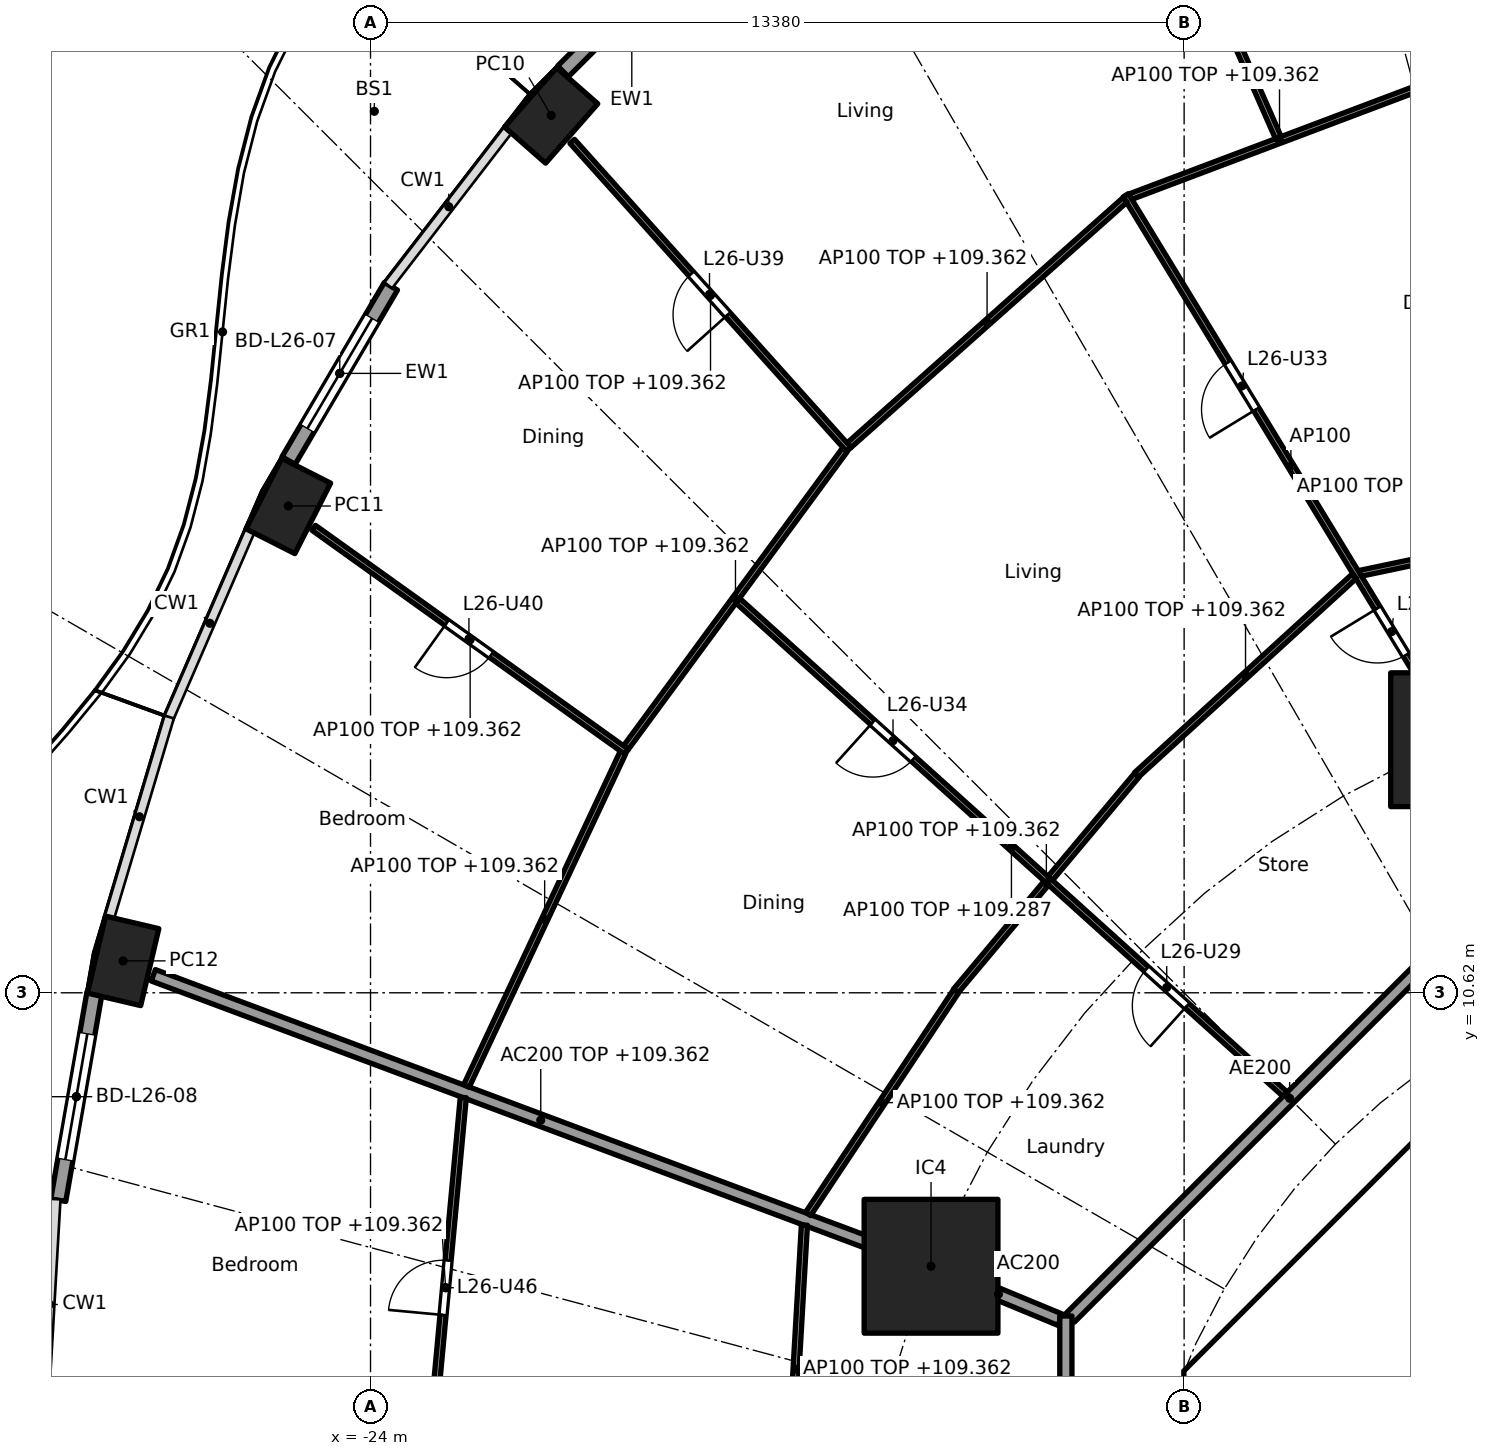
"""IFC4 building model, lengths in metres.
Left out: names, types, materials, properties, quantities, classifications, styles, units other than length and angle.
Written with IfcOpenShell. Run it as: python <this file> out.ifc"""

import sys

from ifc_helpers import new_model, si_unit, direction, frame, frame_2d, origin, origin_2d, place, context, subcontext, project, spatial, polyline, rectangle, hollow_rectangle, outline, extrude, element, fill, save


model = new_model("IFC4")
c1 = context("Model", 3, precision=1e-05, world=origin(), true_north=direction((0.0, 1.0)))
c2 = subcontext(c1, "Body", "Model", "MODEL_VIEW")
j1 = project(units=[si_unit("LENGTHUNIT", "METRE"), si_unit("PLANEANGLEUNIT", "RADIAN")], contexts=[c1])
p1 = place(None, origin())
s1 = spatial("IfcSite", under=j1, at=p1, CompositionType="ELEMENT")
p2 = place(p1, origin())
s2 = spatial("IfcBuilding", under=s1, at=p2, CompositionType="ELEMENT")
p3 = place(p2, frame((0.0, 0.0, 106.6)))
s3 = spatial("IfcBuildingStorey", under=s2, at=p3, CompositionType="ELEMENT", Elevation=106.6)
for number, where, z_axis, x_axis in (
    (1, (-21.03, 25.049, 0.0), (0.0, 0.0, 1.0), (-0.66, -0.751, 0.0)),
    (2, (-25.352, 18.625, 0.0), (0.0, 0.0, 1.0), (-0.452, -0.892, 0.0)),
    (3, (-28.068, 11.145, 0.0), (0.0, 0.0, 1.0), (-0.229, -0.973, 0.0)),
):
    element("IfcColumn", number, at=place(p3, frame(where, z_axis=z_axis, x_axis=x_axis)), inside=s3, PredefinedType="COLUMN", context=c2, shape_type="SweptSolid", body=[
        extrude(hollow_rectangle(XDim=1.3, YDim=0.9, WallThickness=0.045, at=origin_2d()), origin(), (0.0, 0.0, 1.0), 3.7),
    ])
for number, where, z_axis, x_axis in (
    (4, (-6.123, 14.782, 0.0), (0.0, 0.0, 1.0), (1.0, 0.0, 0.0)),
    (5, (-14.782, 6.123, 0.0), (0.0, 0.0, 1.0), (1.0, 0.0, 0.0)),
):
    element("IfcColumn", number, at=place(p3, frame(where, z_axis=z_axis, x_axis=x_axis)), inside=s3, PredefinedType="COLUMN", context=c2, shape_type="SweptSolid", body=[
        extrude(rectangle(XDim=2.2, YDim=2.2, at=origin_2d()), origin(), (0.0, 0.0, 1.0), 3.7),
    ])
p4 = place(p3, frame((-20.835, 25.773, 0.0), z_axis=(0.0, 0.0, 1.0), x_axis=(0.707831646613, 0.706381171927, 0.0)))
e6 = element("IfcWall", 6, at=p4, inside=s3, PredefinedType="SOLIDWALL", context=c2, shape_type="SweptSolid", body=[
    extrude(rectangle(XDim=3.198, YDim=0.25, at=frame_2d((1.599, 0.0))), origin(), (0.0, 0.0, 1.0), 3.44),
])
p5 = place(p4, frame((0.549, 0.0, 0.0)))
e7 = element("IfcOpeningElement", 7, at=p5, cuts=e6, PredefinedType="OPENING", context=c2, shape_type="SweptSolid", body=[
    extrude(rectangle(XDim=2.1, YDim=2.4, at=frame_2d((1.05, 1.2))), frame((0.0, 0.135, 0.0), z_axis=(0.0, -1.0, 0.0), x_axis=(1.0, 0.0, 0.0)), (0.0, 0.0, 1.0), 0.27),
])
p6 = place(p3, frame((-25.348, 19.372, 0.0), z_axis=(0.0, 0.0, 1.0), x_axis=(0.506352525095, 0.86232657406, 0.0)))
e8 = element("IfcWall", 8, at=p6, inside=s3, PredefinedType="SOLIDWALL", context=c2, shape_type="SweptSolid", body=[
    extrude(rectangle(XDim=3.325, YDim=0.25, at=frame_2d((1.663, 0.0))), origin(), (0.0, 0.0, 1.0), 3.44),
])
p7 = place(p6, frame((0.612, 0.0, 0.0)))
e9 = element("IfcOpeningElement", 9, at=p7, cuts=e8, PredefinedType="OPENING", context=c2, shape_type="SweptSolid", body=[
    extrude(rectangle(XDim=2.1, YDim=2.4, at=frame_2d((1.05, 1.2))), frame((0.0, 0.135, 0.0), z_axis=(0.0, -1.0, 0.0), x_axis=(1.0, 0.0, 0.0)), (0.0, 0.0, 1.0), 0.27),
])
p8 = place(p3, frame((-29.135, 7.21, 0.0), z_axis=(0.0, 0.0, 1.0), x_axis=(0.17223289558, 0.985056257114, 0.0)))
e10 = element("IfcWall", 10, at=p8, inside=s3, PredefinedType="SOLIDWALL", context=c2, shape_type="SweptSolid", body=[
    extrude(rectangle(XDim=3.454, YDim=0.25, at=frame_2d((1.727, 0.0))), origin(), (0.0, 0.0, 1.0), 3.44),
])
p9 = place(p8, frame((0.677, 0.0, 0.0)))
e11 = element("IfcOpeningElement", 11, at=p9, cuts=e10, PredefinedType="OPENING", context=c2, shape_type="SweptSolid", body=[
    extrude(rectangle(XDim=2.1, YDim=2.4, at=frame_2d((1.05, 1.2))), frame((0.0, 0.135, 0.0), z_axis=(0.0, -1.0, 0.0), x_axis=(1.0, 0.0, 0.0)), (0.0, 0.0, 1.0), 0.27),
])
p10 = place(p3, frame((-4.613, 9.988, 0.0), z_axis=(0.0, 0.0, 1.0), x_axis=(-0.707106781187, -0.707106781187, 0.0)))
e12 = element("IfcWall", 12, at=p10, inside=s3, PredefinedType="SHEAR", context=c2, shape_type="SweptSolid", body=[
    extrude(rectangle(XDim=7.602, YDim=0.6, at=frame_2d((3.801, 0.0))), origin(), (0.0, 0.0, 1.0), 3.44),
])
p11 = place(p10, frame((0.351, 0.0, 0.0)))
e13 = element("IfcOpeningElement", 13, at=p11, cuts=e12, PredefinedType="OPENING", context=c2, shape_type="SweptSolid", body=[
    extrude(rectangle(XDim=1.1, YDim=2.1, at=frame_2d((0.55, 1.05))), frame((0.0, 0.31, 0.0), z_axis=(0.0, -1.0, 0.0), x_axis=(1.0, 0.0, 0.0)), (0.0, 0.0, 1.0), 0.62),
])
p12 = place(p3, origin())
e14 = element("IfcWall", 14, at=p12, inside=s3, PredefinedType="SHEAR", context=c2, shape_type="SweptSolid", body=[
    extrude(outline(polyline([(-10.2, 4.825), (-9.776, 4.401), (-10.025, 4.152), (-10.025, 3.801), (-10.625, 3.801), (-10.625, 4.401), (-10.2, 4.825)])), origin(), (0.0, 0.0, 1.0), 3.44),
])
p13 = place(p3, frame((-8.001, 6.1, 0.0), z_axis=(0.0, 0.0, 1.0), x_axis=(1.0, 0.0, 0.0)))
e15 = element("IfcWall", 15, at=p13, inside=s3, PredefinedType="PARTITIONING", context=c2, shape_type="SweptSolid", body=[
    extrude(rectangle(XDim=2.126, YDim=0.15, at=frame_2d((1.063, 0.0))), origin(), (0.0, 0.0, 1.0), 3.44),
])
p14 = place(p3, frame((-12.657, 5.243, 0.0), z_axis=(0.0, 0.0, 1.0), x_axis=(-0.923843626288, 0.382770106157, 0.0)))
e16 = element("IfcWall", 16, at=p14, inside=s3, PredefinedType="PARTITIONING", context=c2, shape_type="SweptSolid", body=[
    extrude(rectangle(XDim=2.199, YDim=0.2, at=frame_2d((1.1, 0.0))), origin(), (0.0, 0.0, 1.0), 3.44),
])
p15 = place(p3, frame((-14.829, 6.14, 0.0), z_axis=(0.0, 0.0, 1.0), x_axis=(-0.936597324342, 0.35040755134, 0.0)))
e17 = element("IfcWall", 17, at=p15, inside=s3, PredefinedType="PARTITIONING", context=c2, shape_type="SweptSolid", body=[
    extrude(rectangle(XDim=13.606, YDim=0.2, at=frame_2d((6.803, 0.0))), origin(), (0.0, 0.0, 1.0), 2.762),
])
p16 = place(p3, frame((-5.275, 12.494, 0.0), z_axis=(0.0, 0.0, 1.0), x_axis=(-0.707106781187, -0.707106781187, 0.0)))
e18 = element("IfcWall", 18, at=p16, inside=s3, PredefinedType="PARTITIONING", context=c2, shape_type="SweptSolid", body=[
    extrude(rectangle(XDim=10.209, YDim=0.2, at=frame_2d((5.104, 0.0))), origin(), (0.0, 0.0, 1.0), 3.44),
])
p17 = place(p3, frame((-12.565, 5.304, 0.0), z_axis=(0.0, 0.0, 1.0), x_axis=(0.0, -1.0, 0.0)))
e19 = element("IfcWall", 19, at=p17, inside=s3, PredefinedType="PARTITIONING", context=c2, shape_type="SweptSolid", body=[
    extrude(rectangle(XDim=10.409, YDim=0.2, at=frame_2d((5.205, 0.0))), origin(), (0.0, 0.0, 1.0), 3.44),
])
p18 = place(p17, frame((6.539, 0.0, 0.0)))
e20 = element("IfcOpeningElement", 20, at=p18, cuts=e19, PredefinedType="OPENING", context=c2, shape_type="SweptSolid", body=[
    extrude(rectangle(XDim=1.0, YDim=2.1, at=frame_2d((0.5, 1.05))), frame((0.0, 0.11, 0.0), z_axis=(0.0, -1.0, 0.0), x_axis=(1.0, 0.0, 0.0)), (0.0, 0.0, 1.0), 0.22),
])
p19 = place(p3, frame((-4.272, 18.243, 0.0), z_axis=(0.0, 0.0, 1.0), x_axis=(-0.978622947907, -0.205662650547, 0.0)))
e21 = element("IfcWall", 21, at=p19, inside=s3, PredefinedType="PARTITIONING", context=c2, shape_type="SweptSolid", body=[
    extrude(rectangle(XDim=3.538, YDim=0.1, at=frame_2d((1.769, 0.0))), origin(), (0.0, 0.0, 1.0), 2.762),
])
p20 = place(p3, frame((-6.596, 25.563, 0.0), z_axis=(0.0, 0.0, 1.0), x_axis=(-0.9356162121, -0.353018843201, 0.0)))
e22 = element("IfcWall", 22, at=p20, inside=s3, PredefinedType="PARTITIONING", context=c2, shape_type="SweptSolid", body=[
    extrude(rectangle(XDim=5.249, YDim=0.1, at=frame_2d((2.625, 0.0))), origin(), (0.0, 0.0, 1.0), 2.762),
])
p21 = place(p3, frame((-9.072, 24.683, 0.0), z_axis=(0.0, 0.0, 1.0), x_axis=(-0.403192911159, 0.915115007194, 0.0)))
e23 = element("IfcWall", 23, at=p21, inside=s3, PredefinedType="PARTITIONING", context=c2, shape_type="SweptSolid", body=[
    extrude(rectangle(XDim=8.211, YDim=0.1, at=frame_2d((4.106, 0.0))), origin(), (0.0, 0.0, 1.0), 2.837),
])
p22 = place(p21, frame((3.656, 0.0, 0.0)))
e24 = element("IfcOpeningElement", 24, at=p22, cuts=e23, PredefinedType="OPENING", context=c2, shape_type="SweptSolid", body=[
    extrude(rectangle(XDim=0.9, YDim=2.1, at=frame_2d((0.45, 1.05))), frame((0.0, 0.06, 0.0), z_axis=(0.0, -1.0, 0.0), x_axis=(1.0, 0.0, 0.0)), (0.0, 0.0, 1.0), 0.12),
])
p23 = place(p3, frame((-6.149, 14.825, 0.0), z_axis=(0.0, 0.0, 1.0), x_axis=(-0.520411490252, 0.853915616917, 0.0)))
e25 = element("IfcWall", 25, at=p23, inside=s3, PredefinedType="PARTITIONING", context=c2, shape_type="SweptSolid", body=[
    extrude(rectangle(XDim=10.435, YDim=0.1, at=frame_2d((5.218, 0.0))), origin(), (0.0, 0.0, 1.0), 3.44),
])
p24 = place(p23, frame((1.582, 0.0, 0.0)))
e26 = element("IfcOpeningElement", 26, at=p24, cuts=e25, PredefinedType="OPENING", context=c2, shape_type="SweptSolid", body=[
    extrude(rectangle(XDim=0.9, YDim=2.1, at=frame_2d((0.45, 1.05))), frame((0.0, 0.06, 0.0), z_axis=(0.0, -1.0, 0.0), x_axis=(1.0, 0.0, 0.0)), (0.0, 0.0, 1.0), 0.12),
])
p25 = place(p23, frame((6.312, 0.0, 0.0)))
e27 = element("IfcOpeningElement", 27, at=p25, cuts=e25, PredefinedType="OPENING", context=c2, shape_type="SweptSolid", body=[
    extrude(rectangle(XDim=0.9, YDim=2.1, at=frame_2d((0.45, 1.05))), frame((0.0, 0.06, 0.0), z_axis=(0.0, -1.0, 0.0), x_axis=(1.0, 0.0, 0.0)), (0.0, 0.0, 1.0), 0.12),
])
p26 = place(p3, frame((-7.82, 17.472, 0.0), z_axis=(0.0, 0.0, 1.0), x_axis=(-0.73885182489, -0.67386792538, 0.0)))
e28 = element("IfcWall", 28, at=p26, inside=s3, PredefinedType="PARTITIONING", context=c2, shape_type="SweptSolid", body=[
    extrude(rectangle(XDim=4.846, YDim=0.1, at=frame_2d((2.423, 0.0))), origin(), (0.0, 0.0, 1.0), 2.762),
])
p27 = place(p3, frame((-11.591, 23.66, 0.0), z_axis=(0.0, 0.0, 1.0), x_axis=(-0.747429278403, -0.664341383466, 0.0)))
e29 = element("IfcWall", 29, at=p27, inside=s3, PredefinedType="PARTITIONING", context=c2, shape_type="SweptSolid", body=[
    extrude(rectangle(XDim=6.073, YDim=0.1, at=frame_2d((3.037, 0.0))), origin(), (0.0, 0.0, 1.0), 2.762),
])
p28 = place(p3, frame((-11.396, 14.202, 0.0), z_axis=(0.0, 0.0, 1.0), x_axis=(-0.642475660273, -0.766306091557, 0.0)))
e30 = element("IfcWall", 30, at=p28, inside=s3, PredefinedType="PARTITIONING", context=c2, shape_type="SweptSolid", body=[
    extrude(rectangle(XDim=4.637, YDim=0.1, at=frame_2d((2.319, 0.0))), origin(), (0.0, 0.0, 1.0), 2.762),
])
p29 = place(p3, frame((-16.134, 19.554, 0.0), z_axis=(0.0, 0.0, 1.0), x_axis=(-0.667985610263, 0.74417418961, 0.0)))
e31 = element("IfcWall", 31, at=p29, inside=s3, PredefinedType="PARTITIONING", context=c2, shape_type="SweptSolid", body=[
    extrude(rectangle(XDim=6.809, YDim=0.1, at=frame_2d((3.405, 0.0))), origin(), (0.0, 0.0, 1.0), 2.762),
])
p30 = place(p29, frame((2.98, 0.0, 0.0)))
e32 = element("IfcOpeningElement", 32, at=p30, cuts=e31, PredefinedType="OPENING", context=c2, shape_type="SweptSolid", body=[
    extrude(rectangle(XDim=0.9, YDim=2.1, at=frame_2d((0.45, 1.05))), frame((0.0, 0.06, 0.0), z_axis=(0.0, -1.0, 0.0), x_axis=(1.0, 0.0, 0.0)), (0.0, 0.0, 1.0), 0.12),
])
p31 = place(p3, frame((-16.197, 19.551, 0.0), z_axis=(0.0, 0.0, 1.0), x_axis=(-0.592391983588, -0.80564988536, 0.0)))
e33 = element("IfcWall", 33, at=p31, inside=s3, PredefinedType="PARTITIONING", context=c2, shape_type="SweptSolid", body=[
    extrude(rectangle(XDim=6.08, YDim=0.1, at=frame_2d((3.04, 0.0))), origin(), (0.0, 0.0, 1.0), 2.762),
])
p32 = place(p3, frame((-8.959, 8.952, 0.0), z_axis=(0.0, 0.0, 1.0), x_axis=(-0.742679904999, 0.669646592398, 0.0)))
e34 = element("IfcWall", 34, at=p32, inside=s3, PredefinedType="PARTITIONING", context=c2, shape_type="SweptSolid", body=[
    extrude(rectangle(XDim=12.121, YDim=0.1, at=frame_2d((6.061, 0.0))), origin(), (0.0, 0.0, 1.0), 2.687),
])
p33 = place(p32, frame((2.172, 0.0, 0.0)))
e35 = element("IfcOpeningElement", 35, at=p33, cuts=e34, PredefinedType="OPENING", context=c2, shape_type="SweptSolid", body=[
    extrude(rectangle(XDim=0.9, YDim=2.1, at=frame_2d((0.45, 1.05))), frame((0.0, 0.06, 0.0), z_axis=(0.0, -1.0, 0.0), x_axis=(1.0, 0.0, 0.0)), (0.0, 0.0, 1.0), 0.12),
])
p34 = place(p32, frame((8.233, 0.0, 0.0)))
e36 = element("IfcOpeningElement", 36, at=p34, cuts=e34, PredefinedType="OPENING", context=c2, shape_type="SweptSolid", body=[
    extrude(rectangle(XDim=0.9, YDim=2.1, at=frame_2d((0.45, 1.05))), frame((0.0, 0.06, 0.0), z_axis=(0.0, -1.0, 0.0), x_axis=(1.0, 0.0, 0.0)), (0.0, 0.0, 1.0), 0.12),
])
p35 = place(p3, frame((-14.371, 10.645, 0.0), z_axis=(0.0, 0.0, 1.0), x_axis=(-0.553341009285, -0.832954817168, 0.0)))
e37 = element("IfcWall", 37, at=p35, inside=s3, PredefinedType="PARTITIONING", context=c2, shape_type="SweptSolid", body=[
    extrude(rectangle(XDim=4.396, YDim=0.1, at=frame_2d((2.198, 0.0))), origin(), (0.0, 0.0, 1.0), 2.762),
])
p36 = place(p3, frame((-19.788, 14.583, 0.0), z_axis=(0.0, 0.0, 1.0), x_axis=(-0.813175286569, 0.58201885993, 0.0)))
e38 = element("IfcWall", 38, at=p36, inside=s3, PredefinedType="PARTITIONING", context=c2, shape_type="SweptSolid", body=[
    extrude(rectangle(XDim=6.329, YDim=0.1, at=frame_2d((3.164, 0.0))), origin(), (0.0, 0.0, 1.0), 2.762),
])
p37 = place(p36, frame((2.739, 0.0, 0.0)))
e39 = element("IfcOpeningElement", 39, at=p37, cuts=e38, PredefinedType="OPENING", context=c2, shape_type="SweptSolid", body=[
    extrude(rectangle(XDim=0.9, YDim=2.1, at=frame_2d((0.45, 1.05))), frame((0.0, 0.06, 0.0), z_axis=(0.0, -1.0, 0.0), x_axis=(1.0, 0.0, 0.0)), (0.0, 0.0, 1.0), 0.12),
])
p38 = place(p3, frame((-19.85, 14.567, 0.0), z_axis=(0.0, 0.0, 1.0), x_axis=(-0.424942210745, -0.905220480064, 0.0)))
e40 = element("IfcWall", 40, at=p38, inside=s3, PredefinedType="PARTITIONING", context=c2, shape_type="SweptSolid", body=[
    extrude(rectangle(XDim=6.053, YDim=0.1, at=frame_2d((3.027, 0.0))), origin(), (0.0, 0.0, 1.0), 2.762),
])
p39 = place(p3, frame((-16.865, 6.8, 0.0), z_axis=(0.0, 0.0, 1.0), x_axis=(-0.05777584434, -0.998329580755, 0.0)))
e41 = element("IfcWall", 41, at=p39, inside=s3, PredefinedType="PARTITIONING", context=c2, shape_type="SweptSolid", body=[
    extrude(rectangle(XDim=4.75, YDim=0.1, at=frame_2d((2.375, 0.0))), origin(), (0.0, 0.0, 1.0), 2.762),
])
p40 = place(p3, frame((-22.474, 8.898, 0.0), z_axis=(0.0, 0.0, 1.0), x_axis=(-0.092756864489, -0.995688788774, 0.0)))
e42 = element("IfcWall", 42, at=p40, inside=s3, PredefinedType="PARTITIONING", context=c2, shape_type="SweptSolid", body=[
    extrude(rectangle(XDim=6.283, YDim=0.1, at=frame_2d((3.141, 0.0))), origin(), (0.0, 0.0, 1.0), 2.762),
])
p41 = place(p40, frame((2.691, 0.0, 0.0)))
e43 = element("IfcOpeningElement", 43, at=p41, cuts=e42, PredefinedType="OPENING", context=c2, shape_type="SweptSolid", body=[
    extrude(rectangle(XDim=0.9, YDim=2.1, at=frame_2d((0.45, 1.05))), frame((0.0, 0.06, 0.0), z_axis=(0.0, -1.0, 0.0), x_axis=(1.0, 0.0, 0.0)), (0.0, 0.0, 1.0), 0.12),
])
p42 = place(p7, origin())
e44 = element("IfcDoor", 44, at=p42, inside=s3, OperationType="SLIDING_TO_LEFT", PredefinedType="DOOR", context=c2, shape_type="SweptSolid", body=[
    extrude(rectangle(XDim=2.1, YDim=2.4, at=frame_2d((1.05, 1.2))), frame((0.0, 0.025, 0.0), z_axis=(0.0, -1.0, 0.0), x_axis=(1.0, 0.0, 0.0)), (0.0, 0.0, 1.0), 0.05),
])
fill(e9, e44)
p43 = place(p9, origin())
e45 = element("IfcDoor", 45, at=p43, inside=s3, OperationType="SLIDING_TO_LEFT", PredefinedType="DOOR", context=c2, shape_type="SweptSolid", body=[
    extrude(rectangle(XDim=2.1, YDim=2.4, at=frame_2d((1.05, 1.2))), frame((0.0, 0.025, 0.0), z_axis=(0.0, -1.0, 0.0), x_axis=(1.0, 0.0, 0.0)), (0.0, 0.0, 1.0), 0.05),
])
fill(e11, e45)
p44 = place(p24, origin())
e46 = element("IfcDoor", 46, at=p44, inside=s3, OperationType="SINGLE_SWING_RIGHT", PredefinedType="DOOR", context=c2, shape_type="SweptSolid", body=[
    extrude(rectangle(XDim=0.9, YDim=2.1, at=frame_2d((0.45, 1.05))), frame((0.0, 0.025, 0.0), z_axis=(0.0, -1.0, 0.0), x_axis=(1.0, 0.0, 0.0)), (0.0, 0.0, 1.0), 0.05),
])
fill(e26, e46)
p45 = place(p33, origin())
e47 = element("IfcDoor", 47, at=p45, inside=s3, OperationType="SINGLE_SWING_LEFT", PredefinedType="DOOR", context=c2, shape_type="SweptSolid", body=[
    extrude(rectangle(XDim=0.9, YDim=2.1, at=frame_2d((0.45, 1.05))), frame((0.0, 0.025, 0.0), z_axis=(0.0, -1.0, 0.0), x_axis=(1.0, 0.0, 0.0)), (0.0, 0.0, 1.0), 0.05),
])
fill(e35, e47)
p46 = place(p25, origin())
e48 = element("IfcDoor", 48, at=p46, inside=s3, OperationType="SINGLE_SWING_LEFT", PredefinedType="DOOR", context=c2, shape_type="SweptSolid", body=[
    extrude(rectangle(XDim=0.9, YDim=2.1, at=frame_2d((0.45, 1.05))), frame((0.0, 0.025, 0.0), z_axis=(0.0, -1.0, 0.0), x_axis=(1.0, 0.0, 0.0)), (0.0, 0.0, 1.0), 0.05),
])
fill(e27, e48)
p47 = place(p34, origin())
e49 = element("IfcDoor", 49, at=p47, inside=s3, OperationType="SINGLE_SWING_RIGHT", PredefinedType="DOOR", context=c2, shape_type="SweptSolid", body=[
    extrude(rectangle(XDim=0.9, YDim=2.1, at=frame_2d((0.45, 1.05))), frame((0.0, 0.025, 0.0), z_axis=(0.0, -1.0, 0.0), x_axis=(1.0, 0.0, 0.0)), (0.0, 0.0, 1.0), 0.05),
])
fill(e36, e49)
p48 = place(p30, origin())
e50 = element("IfcDoor", 50, at=p48, inside=s3, OperationType="SINGLE_SWING_LEFT", PredefinedType="DOOR", context=c2, shape_type="SweptSolid", body=[
    extrude(rectangle(XDim=0.9, YDim=2.1, at=frame_2d((0.45, 1.05))), frame((0.0, 0.025, 0.0), z_axis=(0.0, -1.0, 0.0), x_axis=(1.0, 0.0, 0.0)), (0.0, 0.0, 1.0), 0.05),
])
fill(e32, e50)
p49 = place(p37, origin())
e51 = element("IfcDoor", 51, at=p49, inside=s3, OperationType="SINGLE_SWING_RIGHT", PredefinedType="DOOR", context=c2, shape_type="SweptSolid", body=[
    extrude(rectangle(XDim=0.9, YDim=2.1, at=frame_2d((0.45, 1.05))), frame((0.0, 0.025, 0.0), z_axis=(0.0, -1.0, 0.0), x_axis=(1.0, 0.0, 0.0)), (0.0, 0.0, 1.0), 0.05),
])
fill(e39, e51)
p50 = place(p41, frame((0.9, 0.0, 0.0), x_axis=(-1.0, 0.0, 0.0)))
e52 = element("IfcDoor", 52, at=p50, inside=s3, OperationType="SINGLE_SWING_LEFT", PredefinedType="DOOR", context=c2, shape_type="SweptSolid", body=[
    extrude(rectangle(XDim=0.9, YDim=2.1, at=frame_2d((0.45, 1.05))), frame((0.0, 0.025, 0.0), z_axis=(0.0, -1.0, 0.0), x_axis=(1.0, 0.0, 0.0)), (0.0, 0.0, 1.0), 0.05),
])
fill(e43, e52)
save(model, sys.argv[1])
